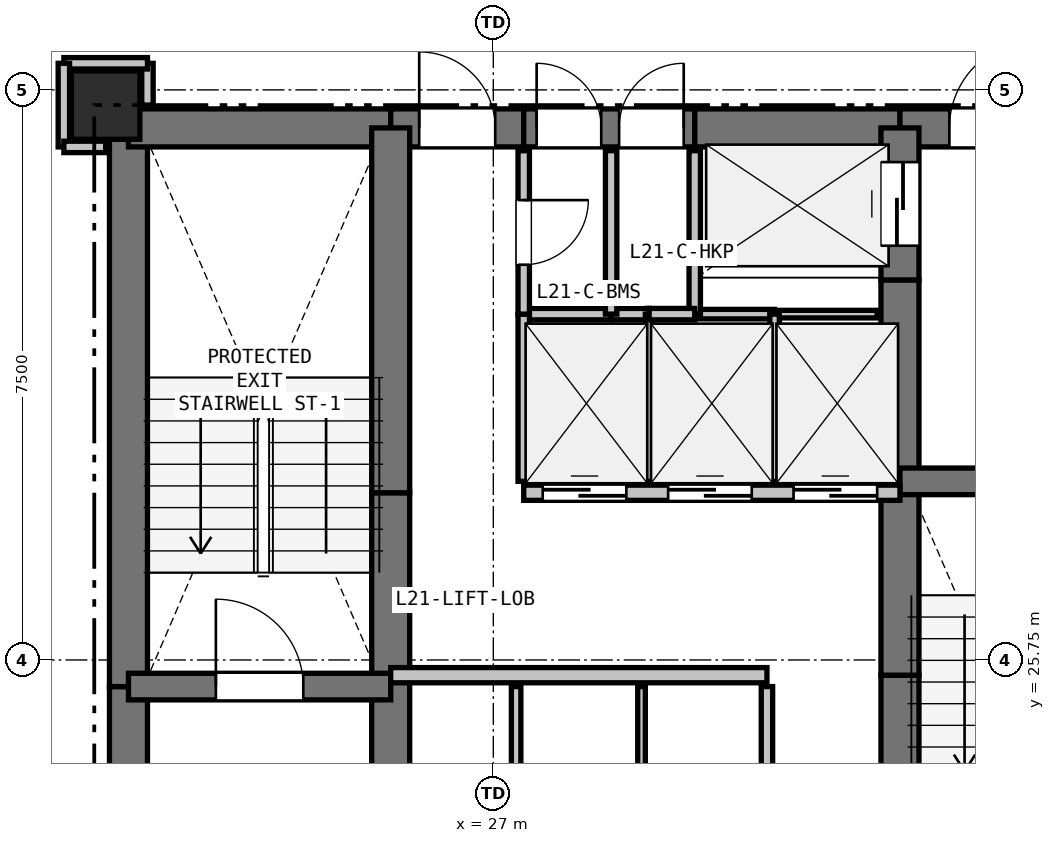
"""IFC4 building model, lengths in metres.
Left out: names, types, materials, properties, quantities, classifications, styles, units other than length and angle.
Written with IfcOpenShell. Run it as: python <this file> out.ifc"""

import sys

from ifc_helpers import new_model, si_unit, direction, frame, frame_2d, origin, origin_2d, place, context, subcontext, project, spatial, rectangle, extrude, element, fill, save


model = new_model("IFC4")
c1 = context("Model", 3, precision=1e-05, world=origin(), true_north=direction((0.0, 1.0)))
c2 = subcontext(c1, "Body", "Model", "MODEL_VIEW")
j1 = project(units=[si_unit("LENGTHUNIT", "METRE"), si_unit("PLANEANGLEUNIT", "RADIAN")], contexts=[c1])
p1 = place(None, origin())
s1 = spatial("IfcSite", under=j1, at=p1, CompositionType="ELEMENT")
p2 = place(p1, origin())
s2 = spatial("IfcBuilding", under=s1, at=p2, CompositionType="ELEMENT")
p3 = place(p2, frame((0.0, 0.0, 80.1)))
s3 = spatial("IfcBuildingStorey", under=s2, at=p3, CompositionType="ELEMENT", Elevation=80.1)
p4 = place(p3, frame((21.9, 33.05, 0.0), z_axis=(0.0, 0.0, 1.0), x_axis=(1.0, 0.0, 0.0)))
e1 = element("IfcColumn", 1, at=p4, inside=s3, PredefinedType="COLUMN", context=c2, shape_type="SweptSolid", body=[
    extrude(rectangle(XDim=0.9, YDim=0.9, at=origin_2d()), origin(), (0.0, 0.0, 1.0), 3.3),
])
p5 = place(p3, frame((22.2, 20.75, 0.0), z_axis=(0.0, 0.0, 1.0), x_axis=(0.0, 1.0, 0.0)))
e2 = element("IfcWall", 2, at=p5, inside=s3, PredefinedType="SHEAR", context=c2, shape_type="SweptSolid", body=[
    extrude(rectangle(XDim=4.65, YDim=0.5, at=frame_2d((2.325, 0.0))), origin(), (0.0, 0.0, 1.0), 3.05),
])
p6 = place(p3, frame((22.2, 25.4, 0.0), z_axis=(0.0, 0.0, 1.0), x_axis=(0.0, 1.0, 0.0)))
e3 = element("IfcWall", 3, at=p6, inside=s3, PredefinedType="SHEAR", context=c2, shape_type="SweptSolid", body=[
    extrude(rectangle(XDim=7.35, YDim=0.5, at=frame_2d((3.675, 0.0))), origin(), (0.0, 0.0, 1.0), 3.05),
])
p7 = place(p3, frame((22.2, 32.75, 0.0), z_axis=(0.0, 0.0, 1.0), x_axis=(1.0, 0.0, 0.0)))
e4 = element("IfcWall", 4, at=p7, inside=s3, PredefinedType="SHEAR", context=c2, shape_type="SweptSolid", body=[
    extrude(rectangle(XDim=3.45, YDim=0.5, at=frame_2d((1.725, 0.0))), origin(), (0.0, 0.0, 1.0), 3.05),
])
p8 = place(p3, frame((25.65, 32.75, 0.0), z_axis=(0.0, 0.0, 1.0), x_axis=(1.0, 0.0, 0.0)))
e5 = element("IfcWall", 5, at=p8, inside=s3, PredefinedType="SHEAR", context=c2, shape_type="SweptSolid", body=[
    extrude(rectangle(XDim=1.75, YDim=0.5, at=frame_2d((0.875, 0.0))), origin(), (0.0, 0.0, 1.0), 3.05),
])
p9 = place(p8, frame((0.375, 0.0, 0.0)))
e6 = element("IfcOpeningElement", 6, at=p9, cuts=e5, PredefinedType="OPENING", context=c2, shape_type="SweptSolid", body=[
    extrude(rectangle(XDim=1.0, YDim=2.15, at=frame_2d((0.5, 1.075))), frame((0.0, 0.26, 0.0), z_axis=(0.0, -1.0, 0.0), x_axis=(1.0, 0.0, 0.0)), (0.0, 0.0, 1.0), 0.52),
])
p10 = place(p3, frame((27.4, 32.75, 0.0), z_axis=(0.0, 0.0, 1.0), x_axis=(1.0, 0.0, 0.0)))
e7 = element("IfcWall", 7, at=p10, inside=s3, PredefinedType="SHEAR", context=c2, shape_type="SweptSolid", body=[
    extrude(rectangle(XDim=2.25, YDim=0.5, at=frame_2d((1.125, 0.0))), origin(), (0.0, 0.0, 1.0), 3.05),
])
p11 = place(p10, frame((0.17, 0.0, 0.0)))
e8 = element("IfcOpeningElement", 8, at=p11, cuts=e7, PredefinedType="OPENING", context=c2, shape_type="SweptSolid", body=[
    extrude(rectangle(XDim=0.85, YDim=2.1, at=frame_2d((0.425, 1.05))), frame((0.0, 0.26, 0.0), z_axis=(0.0, -1.0, 0.0), x_axis=(1.0, 0.0, 0.0)), (0.0, 0.0, 1.0), 0.52),
])
p12 = place(p10, frame((1.255, 0.0, 0.0)))
e9 = element("IfcOpeningElement", 9, at=p12, cuts=e7, PredefinedType="OPENING", context=c2, shape_type="SweptSolid", body=[
    extrude(rectangle(XDim=0.85, YDim=2.1, at=frame_2d((0.425, 1.05))), frame((0.0, 0.26, 0.0), z_axis=(0.0, -1.0, 0.0), x_axis=(1.0, 0.0, 0.0)), (0.0, 0.0, 1.0), 0.52),
])
p13 = place(p3, frame((29.65, 32.75, 0.0), z_axis=(0.0, 0.0, 1.0), x_axis=(1.0, 0.0, 0.0)))
e10 = element("IfcWall", 10, at=p13, inside=s3, PredefinedType="SHEAR", context=c2, shape_type="SweptSolid", body=[
    extrude(rectangle(XDim=2.7, YDim=0.5, at=frame_2d((1.35, 0.0))), origin(), (0.0, 0.0, 1.0), 3.05),
])
p14 = place(p3, frame((32.35, 32.75, 0.0), z_axis=(0.0, 0.0, 1.0), x_axis=(1.0, 0.0, 0.0)))
e11 = element("IfcWall", 11, at=p14, inside=s3, PredefinedType="SHEAR", context=c2, shape_type="SweptSolid", body=[
    extrude(rectangle(XDim=3.45, YDim=0.5, at=frame_2d((1.725, 0.0))), origin(), (0.0, 0.0, 1.0), 3.05),
])
p15 = place(p14, frame((0.65, 0.0, 0.0)))
e12 = element("IfcOpeningElement", 12, at=p15, cuts=e11, PredefinedType="OPENING", context=c2, shape_type="SweptSolid", body=[
    extrude(rectangle(XDim=1.15, YDim=2.15, at=frame_2d((0.575, 1.075))), frame((0.0, 0.26, 0.0), z_axis=(0.0, -1.0, 0.0), x_axis=(1.0, 0.0, 0.0)), (0.0, 0.0, 1.0), 0.52),
])
p16 = place(p3, frame((25.65, 22.75, 0.0), z_axis=(0.0, 0.0, 1.0), x_axis=(0.0, 1.0, 0.0)))
e13 = element("IfcWall", 13, at=p16, inside=s3, PredefinedType="SHEAR", context=c2, shape_type="SweptSolid", body=[
    extrude(rectangle(XDim=2.8, YDim=0.5, at=frame_2d((1.4, 0.0))), origin(), (0.0, 0.0, 1.0), 3.05),
])
p17 = place(p3, frame((25.65, 25.55, 0.0), z_axis=(0.0, 0.0, 1.0), x_axis=(0.0, 1.0, 0.0)))
e14 = element("IfcWall", 14, at=p17, inside=s3, PredefinedType="SHEAR", context=c2, shape_type="SweptSolid", body=[
    extrude(rectangle(XDim=2.4, YDim=0.5, at=frame_2d((1.2, 0.0))), origin(), (0.0, 0.0, 1.0), 3.05),
])
for number, where, z_axis, x_axis in (
    (15, (25.65, 27.95, 0.0), (0.0, 0.0, 1.0), (0.0, 1.0, 0.0)),
    (16, (32.35, 20.75, 0.0), (0.0, 0.0, 1.0), (0.0, 1.0, 0.0)),
):
    element("IfcWall", number, at=place(p3, frame(where, z_axis=z_axis, x_axis=x_axis)), inside=s3, PredefinedType="SHEAR", context=c2, shape_type="SweptSolid", body=[
        extrude(rectangle(XDim=4.8, YDim=0.5, at=frame_2d((2.4, 0.0))), origin(), (0.0, 0.0, 1.0), 3.05),
    ])
p18 = place(p3, frame((32.35, 25.55, 0.0), z_axis=(0.0, 0.0, 1.0), x_axis=(0.0, 1.0, 0.0)))
e17 = element("IfcWall", 17, at=p18, inside=s3, PredefinedType="SHEAR", context=c2, shape_type="SweptSolid", body=[
    extrude(rectangle(XDim=2.4, YDim=0.5, at=frame_2d((1.2, 0.0))), origin(), (0.0, 0.0, 1.0), 3.05),
])
p19 = place(p3, frame((32.35, 27.95, 0.0), z_axis=(0.0, 0.0, 1.0), x_axis=(0.0, 1.0, 0.0)))
e18 = element("IfcWall", 18, at=p19, inside=s3, PredefinedType="SHEAR", context=c2, shape_type="SweptSolid", body=[
    extrude(rectangle(XDim=2.8, YDim=0.5, at=frame_2d((1.4, 0.0))), origin(), (0.0, 0.0, 1.0), 3.05),
])
p20 = place(p3, frame((32.35, 30.75, 0.0), z_axis=(0.0, 0.0, 1.0), x_axis=(0.0, 1.0, 0.0)))
e19 = element("IfcWall", 19, at=p20, inside=s3, PredefinedType="SHEAR", context=c2, shape_type="SweptSolid", body=[
    extrude(rectangle(XDim=2.0, YDim=0.5, at=frame_2d((1.0, 0.0))), origin(), (0.0, 0.0, 1.0), 3.05),
])
p21 = place(p20, frame((0.45, 0.0, 0.0)))
e20 = element("IfcOpeningElement", 20, at=p21, cuts=e19, PredefinedType="OPENING", context=c2, shape_type="SweptSolid", body=[
    extrude(rectangle(XDim=1.1, YDim=2.15, at=frame_2d((0.55, 1.075))), frame((0.0, 0.26, 0.0), z_axis=(0.0, -1.0, 0.0), x_axis=(1.0, 0.0, 0.0)), (0.0, 0.0, 1.0), 0.52),
])
p22 = place(p3, frame((22.2, 25.4, 0.0), z_axis=(0.0, 0.0, 1.0), x_axis=(1.0, 0.0, 0.0)))
e21 = element("IfcWall", 21, at=p22, inside=s3, PredefinedType="SHEAR", context=c2, shape_type="SweptSolid", body=[
    extrude(rectangle(XDim=3.45, YDim=0.35, at=frame_2d((1.725, 0.0))), origin(), (0.0, 0.0, 1.0), 3.05),
])
p23 = place(p22, frame((1.15, 0.0, 0.0)))
e22 = element("IfcOpeningElement", 22, at=p23, cuts=e21, PredefinedType="OPENING", context=c2, shape_type="SweptSolid", body=[
    extrude(rectangle(XDim=1.15, YDim=2.15, at=frame_2d((0.575, 1.075))), frame((0.0, 0.185, 0.0), z_axis=(0.0, -1.0, 0.0), x_axis=(1.0, 0.0, 0.0)), (0.0, 0.0, 1.0), 0.37),
])
p24 = place(p3, frame((32.35, 28.1, 0.0), z_axis=(0.0, 0.0, 1.0), x_axis=(1.0, 0.0, 0.0)))
e23 = element("IfcWall", 23, at=p24, inside=s3, PredefinedType="SHEAR", context=c2, shape_type="SweptSolid", body=[
    extrude(rectangle(XDim=3.45, YDim=0.35, at=frame_2d((1.725, 0.0))), origin(), (0.0, 0.0, 1.0), 3.05),
])
p25 = place(p24, frame((1.15, 0.0, 0.0)))
e24 = element("IfcOpeningElement", 24, at=p25, cuts=e23, PredefinedType="OPENING", context=c2, shape_type="SweptSolid", body=[
    extrude(rectangle(XDim=1.15, YDim=2.15, at=frame_2d((0.575, 1.075))), frame((0.0, 0.185, 0.0), z_axis=(0.0, -1.0, 0.0), x_axis=(1.0, 0.0, 0.0)), (0.0, 0.0, 1.0), 0.37),
])
p26 = place(p3, frame((25.65, 25.55, 0.0), z_axis=(0.0, 0.0, 1.0), x_axis=(1.0, 0.0, 0.0)))
e25 = element("IfcWall", 25, at=p26, inside=s3, PredefinedType="PARTITIONING", context=c2, shape_type="SweptSolid", body=[
    extrude(rectangle(XDim=4.95, YDim=0.2, at=frame_2d((2.475, 0.0))), origin(), (0.0, 0.0, 1.0), 3.05),
])
p27 = place(p3, frame((27.4, 27.95, 0.0), z_axis=(0.0, 0.0, 1.0), x_axis=(1.0, 0.0, 0.0)))
e26 = element("IfcWall", 26, at=p27, inside=s3, PredefinedType="PARTITIONING", context=c2, shape_type="SweptSolid", body=[
    extrude(rectangle(XDim=4.95, YDim=0.2, at=frame_2d((2.475, 0.0))), origin(), (0.0, 0.0, 1.0), 3.05),
])
p28 = place(p27, frame((0.25, 0.0, 0.0)))
e27 = element("IfcOpeningElement", 27, at=p28, cuts=e26, PredefinedType="OPENING", context=c2, shape_type="SweptSolid", body=[
    extrude(rectangle(XDim=1.1, YDim=2.15, at=frame_2d((0.55, 1.075))), frame((0.0, 0.11, 0.0), z_axis=(0.0, -1.0, 0.0), x_axis=(1.0, 0.0, 0.0)), (0.0, 0.0, 1.0), 0.22),
])
p29 = place(p27, frame((1.9, 0.0, 0.0)))
e28 = element("IfcOpeningElement", 28, at=p29, cuts=e26, PredefinedType="OPENING", context=c2, shape_type="SweptSolid", body=[
    extrude(rectangle(XDim=1.1, YDim=2.15, at=frame_2d((0.55, 1.075))), frame((0.0, 0.11, 0.0), z_axis=(0.0, -1.0, 0.0), x_axis=(1.0, 0.0, 0.0)), (0.0, 0.0, 1.0), 0.22),
])
p30 = place(p27, frame((3.55, 0.0, 0.0)))
e29 = element("IfcOpeningElement", 29, at=p30, cuts=e26, PredefinedType="OPENING", context=c2, shape_type="SweptSolid", body=[
    extrude(rectangle(XDim=1.1, YDim=2.15, at=frame_2d((0.55, 1.075))), frame((0.0, 0.11, 0.0), z_axis=(0.0, -1.0, 0.0), x_axis=(1.0, 0.0, 0.0)), (0.0, 0.0, 1.0), 0.22),
])
p31 = place(p3, frame((32.05, 30.3, 0.0), z_axis=(0.0, 0.0, 1.0), x_axis=(-1.0, 0.0, 0.0)))
e30 = element("IfcWall", 30, at=p31, inside=s3, PredefinedType="PARTITIONING", context=c2, shape_type="SweptSolid", body=[
    extrude(rectangle(XDim=1.35, YDim=0.1, at=frame_2d((0.675, 0.0))), origin(), (0.0, 0.0, 1.0), 3.05),
])
p32 = place(p3, frame((30.7, 30.3, 0.0), z_axis=(0.0, 0.0, 1.0), x_axis=(-1.0, 0.0, 0.0)))
e31 = element("IfcWall", 31, at=p32, inside=s3, PredefinedType="PARTITIONING", context=c2, shape_type="SweptSolid", body=[
    extrude(rectangle(XDim=1.05, YDim=0.125, at=frame_2d((0.525, 0.0))), origin(), (0.0, 0.0, 1.0), 3.05),
])
p33 = place(p3, frame((29.65, 30.3, 0.0), z_axis=(0.0, 0.0, 1.0), x_axis=(0.0, 1.0, 0.0)))
e32 = element("IfcWall", 32, at=p33, inside=s3, PredefinedType="PARTITIONING", context=c2, shape_type="SweptSolid", body=[
    extrude(rectangle(XDim=2.15, YDim=0.15, at=frame_2d((1.075, 0.0))), origin(), (0.0, 0.0, 1.0), 3.05),
])
p34 = place(p3, frame((27.3, 25.4, 0.0), z_axis=(0.0, 0.0, 1.0), x_axis=(0.0, -1.0, 0.0)))
e33 = element("IfcWall", 33, at=p34, inside=s3, PredefinedType="PARTITIONING", context=c2, shape_type="SweptSolid", body=[
    extrude(rectangle(XDim=2.2, YDim=0.125, at=frame_2d((1.1, 0.0))), origin(), (0.0, 0.0, 1.0), 3.05),
])
p35 = place(p3, frame((28.95, 25.4, 0.0), z_axis=(0.0, 0.0, 1.0), x_axis=(0.0, -1.0, 0.0)))
e34 = element("IfcWall", 34, at=p35, inside=s3, PredefinedType="PARTITIONING", context=c2, shape_type="SweptSolid", body=[
    extrude(rectangle(XDim=2.2, YDim=0.1, at=frame_2d((1.1, 0.0))), origin(), (0.0, 0.0, 1.0), 3.05),
])
p36 = place(p3, frame((30.6, 25.4, 0.0), z_axis=(0.0, 0.0, 1.0), x_axis=(0.0, -1.0, 0.0)))
e35 = element("IfcWall", 35, at=p36, inside=s3, PredefinedType="PARTITIONING", context=c2, shape_type="SweptSolid", body=[
    extrude(rectangle(XDim=2.2, YDim=0.15, at=frame_2d((1.1, 0.0))), origin(), (0.0, 0.0, 1.0), 3.05),
])
p37 = place(p3, frame((27.4, 30.3, 0.0), z_axis=(0.0, 0.0, 1.0), x_axis=(1.0, 0.0, 0.0)))
e36 = element("IfcWall", 36, at=p37, inside=s3, PredefinedType="PARTITIONING", context=c2, shape_type="SweptSolid", body=[
    extrude(rectangle(XDim=1.15, YDim=0.15, at=frame_2d((0.575, 0.0))), origin(), (0.0, 0.0, 1.0), 3.05),
])
p38 = place(p3, frame((28.55, 30.3, 0.0), z_axis=(0.0, 0.0, 1.0), x_axis=(1.0, 0.0, 0.0)))
e37 = element("IfcWall", 37, at=p38, inside=s3, PredefinedType="PARTITIONING", context=c2, shape_type="SweptSolid", body=[
    extrude(rectangle(XDim=0.5, YDim=0.15, at=frame_2d((0.25, 0.0))), origin(), (0.0, 0.0, 1.0), 3.05),
])
p39 = place(p3, frame((29.05, 30.3, 0.0), z_axis=(0.0, 0.0, 1.0), x_axis=(0.0, -1.0, 0.0)))
e38 = element("IfcWall", 38, at=p39, inside=s3, PredefinedType="PARTITIONING", context=c2, shape_type="SweptSolid", body=[
    extrude(rectangle(XDim=2.2, YDim=0.1, at=frame_2d((1.1, 0.0))), origin(), (0.0, 0.0, 1.0), 3.05),
])
p40 = place(p3, frame((27.4, 28.1, 0.0), z_axis=(0.0, 0.0, 1.0), x_axis=(0.0, 1.0, 0.0)))
e39 = element("IfcWall", 39, at=p40, inside=s3, PredefinedType="PARTITIONING", context=c2, shape_type="SweptSolid", body=[
    extrude(rectangle(XDim=2.2, YDim=0.15, at=frame_2d((1.1, 0.0))), origin(), (0.0, 0.0, 1.0), 3.05),
])
p41 = place(p3, frame((29.05, 30.3, 0.0), z_axis=(0.0, 0.0, 1.0), x_axis=(1.0, 0.0, 0.0)))
e40 = element("IfcWall", 40, at=p41, inside=s3, PredefinedType="PARTITIONING", context=c2, shape_type="SweptSolid", body=[
    extrude(rectangle(XDim=0.6, YDim=0.15, at=frame_2d((0.3, 0.0))), origin(), (0.0, 0.0, 1.0), 3.05),
])
p42 = place(p3, frame((30.7, 30.3, 0.0), z_axis=(0.0, 0.0, 1.0), x_axis=(0.0, -1.0, 0.0)))
e41 = element("IfcWall", 41, at=p42, inside=s3, PredefinedType="PARTITIONING", context=c2, shape_type="SweptSolid", body=[
    extrude(rectangle(XDim=2.2, YDim=0.125, at=frame_2d((1.1, 0.0))), origin(), (0.0, 0.0, 1.0), 3.05),
])
p43 = place(p3, frame((27.4, 32.45, 0.0), z_axis=(0.0, 0.0, 1.0), x_axis=(0.0, -1.0, 0.0)))
e42 = element("IfcWall", 42, at=p43, inside=s3, PredefinedType="PARTITIONING", context=c2, shape_type="SweptSolid", body=[
    extrude(rectangle(XDim=2.15, YDim=0.15, at=frame_2d((1.075, 0.0))), origin(), (0.0, 0.0, 1.0), 3.05),
])
p44 = place(p43, frame((0.65, 0.0, 0.0)))
e43 = element("IfcOpeningElement", 43, at=p44, cuts=e42, PredefinedType="OPENING", context=c2, shape_type="SweptSolid", body=[
    extrude(rectangle(XDim=0.85, YDim=2.1, at=frame_2d((0.425, 1.05))), frame((0.0, 0.085, 0.0), z_axis=(0.0, -1.0, 0.0), x_axis=(1.0, 0.0, 0.0)), (0.0, 0.0, 1.0), 0.17),
])
p45 = place(p3, frame((22.45, 33.05, 0.0), z_axis=(0.0, 0.0, 1.0), x_axis=(0.0, 1.0, 0.0)))
e44 = element("IfcWall", 44, at=p45, inside=s3, PredefinedType="PARTITIONING", context=c2, shape_type="SweptSolid", body=[
    extrude(rectangle(XDim=0.55, YDim=0.15, at=frame_2d((0.275, 0.0))), origin(), (0.0, 0.0, 1.0), 2.498),
])
p46 = place(p3, frame((22.45, 33.6, 0.0), z_axis=(0.0, 0.0, 1.0), x_axis=(-1.0, 0.0, 0.0)))
e45 = element("IfcWall", 45, at=p46, inside=s3, PredefinedType="PARTITIONING", context=c2, shape_type="SweptSolid", body=[
    extrude(rectangle(XDim=1.1, YDim=0.15, at=frame_2d((0.55, 0.0))), origin(), (0.0, 0.0, 1.0), 3.05),
])
p47 = place(p3, frame((21.35, 33.6, 0.0), z_axis=(0.0, 0.0, 1.0), x_axis=(0.0, -1.0, 0.0)))
e46 = element("IfcWall", 46, at=p47, inside=s3, PredefinedType="PARTITIONING", context=c2, shape_type="SweptSolid", body=[
    extrude(rectangle(XDim=1.1, YDim=0.15, at=frame_2d((0.55, 0.0))), origin(), (0.0, 0.0, 1.0), 2.423),
])
p48 = place(p3, frame((21.35, 32.5, 0.0), z_axis=(0.0, 0.0, 1.0), x_axis=(1.0, 0.0, 0.0)))
e47 = element("IfcWall", 47, at=p48, inside=s3, PredefinedType="PARTITIONING", context=c2, shape_type="SweptSolid", body=[
    extrude(rectangle(XDim=0.55, YDim=0.15, at=frame_2d((0.275, 0.0))), origin(), (0.0, 0.0, 1.0), 2.498),
])
p49 = place(p3, frame((28.55, 32.45, 0.0), z_axis=(0.0, 0.0, 1.0), x_axis=(0.0, -1.0, 0.0)))
e48 = element("IfcWall", 48, at=p49, inside=s3, PredefinedType="PARTITIONING", context=c2, shape_type="SweptSolid", body=[
    extrude(rectangle(XDim=2.15, YDim=0.15, at=frame_2d((1.075, 0.0))), origin(), (0.0, 0.0, 1.0), 3.05),
])
p50 = place(p28, origin())
e49 = element("IfcDoor", 49, at=p50, inside=s3, OperationType="SLIDING_TO_LEFT", PredefinedType="DOOR", context=c2, shape_type="SweptSolid", body=[
    extrude(rectangle(XDim=1.1, YDim=2.15, at=frame_2d((0.55, 1.075))), frame((0.0, 0.025, 0.0), z_axis=(0.0, -1.0, 0.0), x_axis=(1.0, 0.0, 0.0)), (0.0, 0.0, 1.0), 0.05),
])
fill(e27, e49)
p51 = place(p29, origin())
e50 = element("IfcDoor", 50, at=p51, inside=s3, OperationType="SLIDING_TO_LEFT", PredefinedType="DOOR", context=c2, shape_type="SweptSolid", body=[
    extrude(rectangle(XDim=1.1, YDim=2.15, at=frame_2d((0.55, 1.075))), frame((0.0, 0.025, 0.0), z_axis=(0.0, -1.0, 0.0), x_axis=(1.0, 0.0, 0.0)), (0.0, 0.0, 1.0), 0.05),
])
fill(e28, e50)
p52 = place(p30, origin())
e51 = element("IfcDoor", 51, at=p52, inside=s3, OperationType="SLIDING_TO_LEFT", PredefinedType="DOOR", context=c2, shape_type="SweptSolid", body=[
    extrude(rectangle(XDim=1.1, YDim=2.15, at=frame_2d((0.55, 1.075))), frame((0.0, 0.025, 0.0), z_axis=(0.0, -1.0, 0.0), x_axis=(1.0, 0.0, 0.0)), (0.0, 0.0, 1.0), 0.05),
])
fill(e29, e51)
p53 = place(p9, origin())
e52 = element("IfcDoor", 52, at=p53, inside=s3, OperationType="SINGLE_SWING_LEFT", PredefinedType="DOOR", context=c2, shape_type="SweptSolid", body=[
    extrude(rectangle(XDim=1.0, YDim=2.15, at=frame_2d((0.5, 1.075))), frame((0.0, 0.025, 0.0), z_axis=(0.0, -1.0, 0.0), x_axis=(1.0, 0.0, 0.0)), (0.0, 0.0, 1.0), 0.05),
])
fill(e6, e52)
p54 = place(p21, origin())
e53 = element("IfcDoor", 53, at=p54, inside=s3, OperationType="SLIDING_TO_LEFT", PredefinedType="DOOR", context=c2, shape_type="SweptSolid", body=[
    extrude(rectangle(XDim=1.1, YDim=2.15, at=frame_2d((0.55, 1.075))), frame((0.0, 0.025, 0.0), z_axis=(0.0, -1.0, 0.0), x_axis=(1.0, 0.0, 0.0)), (0.0, 0.0, 1.0), 0.05),
])
fill(e20, e53)
p55 = place(p23, origin())
e54 = element("IfcDoor", 54, at=p55, inside=s3, OperationType="SINGLE_SWING_LEFT", PredefinedType="DOOR", context=c2, shape_type="SweptSolid", body=[
    extrude(rectangle(XDim=1.15, YDim=2.15, at=frame_2d((0.575, 1.075))), frame((0.0, 0.025, 0.0), z_axis=(0.0, -1.0, 0.0), x_axis=(1.0, 0.0, 0.0)), (0.0, 0.0, 1.0), 0.05),
])
fill(e22, e54)
p56 = place(p15, origin())
e55 = element("IfcDoor", 55, at=p56, inside=s3, OperationType="SINGLE_SWING_RIGHT", PredefinedType="DOOR", context=c2, shape_type="SweptSolid", body=[
    extrude(rectangle(XDim=1.15, YDim=2.15, at=frame_2d((0.575, 1.075))), frame((0.0, 0.025, 0.0), z_axis=(0.0, -1.0, 0.0), x_axis=(1.0, 0.0, 0.0)), (0.0, 0.0, 1.0), 0.05),
])
fill(e12, e55)
p57 = place(p44, origin())
e56 = element("IfcDoor", 56, at=p57, inside=s3, OperationType="SINGLE_SWING_LEFT", PredefinedType="DOOR", context=c2, shape_type="SweptSolid", body=[
    extrude(rectangle(XDim=0.85, YDim=2.1, at=frame_2d((0.425, 1.05))), frame((0.0, 0.025, 0.0), z_axis=(0.0, -1.0, 0.0), x_axis=(1.0, 0.0, 0.0)), (0.0, 0.0, 1.0), 0.05),
])
fill(e43, e56)
p58 = place(p11, origin())
e57 = element("IfcDoor", 57, at=p58, inside=s3, OperationType="SINGLE_SWING_LEFT", PredefinedType="DOOR", context=c2, shape_type="SweptSolid", body=[
    extrude(rectangle(XDim=0.85, YDim=2.1, at=frame_2d((0.425, 1.05))), frame((0.0, 0.025, 0.0), z_axis=(0.0, -1.0, 0.0), x_axis=(1.0, 0.0, 0.0)), (0.0, 0.0, 1.0), 0.05),
])
fill(e8, e57)
p59 = place(p12, origin())
e58 = element("IfcDoor", 58, at=p59, inside=s3, OperationType="SINGLE_SWING_RIGHT", PredefinedType="DOOR", context=c2, shape_type="SweptSolid", body=[
    extrude(rectangle(XDim=0.85, YDim=2.1, at=frame_2d((0.425, 1.05))), frame((0.0, 0.025, 0.0), z_axis=(0.0, -1.0, 0.0), x_axis=(1.0, 0.0, 0.0)), (0.0, 0.0, 1.0), 0.05),
])
fill(e9, e58)
save(model, sys.argv[1])
